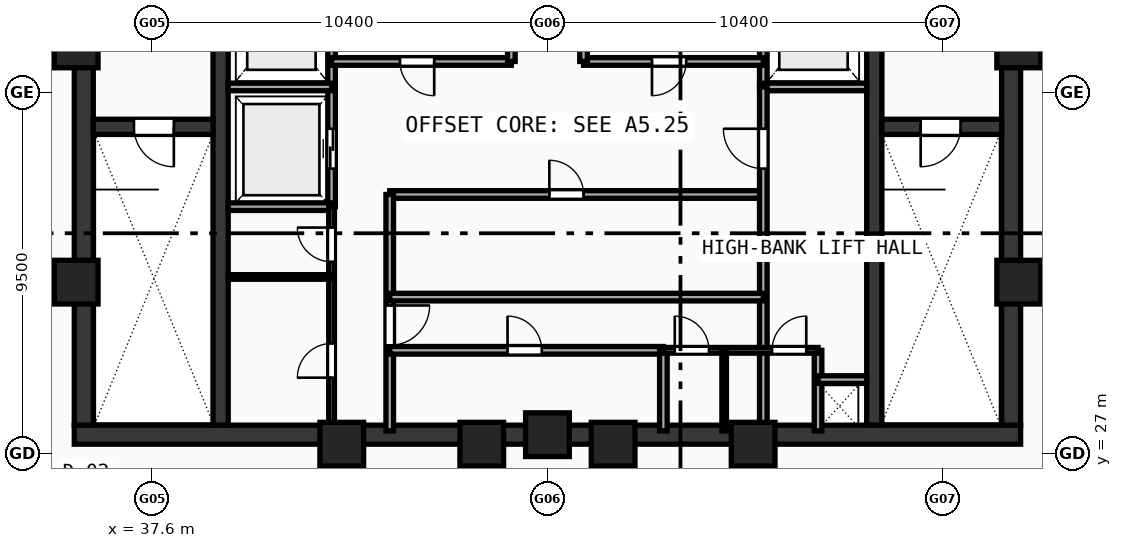
"""IFC4 building model, lengths in metres.
Left out: names, types, materials, properties, quantities, classifications, styles, units other than length and angle.
Written with IfcOpenShell. Run it as: python <this file> out.ifc"""

import sys

from ifc_helpers import new_model, si_unit, direction, frame, frame_2d, origin, origin_with_axes, origin_2d, place, context, subcontext, project, spatial, rectangle, hollow_rectangle, extrude, source, transform, mapped, element, fill, save


model = new_model("IFC4")
c1 = context("Model", 3, precision=1e-05, world=origin(), true_north=direction((0.0, 1.0)))
c2 = subcontext(c1, "Body", "Model", "MODEL_VIEW")
j1 = project(units=[si_unit("LENGTHUNIT", "METRE"), si_unit("PLANEANGLEUNIT", "RADIAN")], contexts=[c1])
p1 = place(None, origin())
s1 = spatial("IfcSite", under=j1, at=p1, CompositionType="ELEMENT")
p2 = place(p1, origin())
s2 = spatial("IfcBuilding", under=s1, at=p2, CompositionType="ELEMENT")
p3 = place(p2, frame((0.0, 0.0, 396.76)))
s3 = spatial("IfcBuildingStorey", under=s2, at=p3, CompositionType="ELEMENT", Elevation=396.76)
p4 = place(p3, frame((35.55, 27.5, 0.0), z_axis=(0.0, 0.0, 1.0), x_axis=(1.0, 0.0, 0.0)))
e1 = element("IfcWall", 1, at=p4, inside=s3, PredefinedType="SHEAR", context=c2, shape_type="SweptSolid", body=[
    extrude(rectangle(XDim=24.9, YDim=0.5, at=frame_2d((12.45, 0.0))), origin(), (0.0, 0.0, 1.0), 4.72),
])
for number, where, z_axis, x_axis in (
    (2, (35.8, 27.75, 0.0), (0.0, 0.0, 1.0), (0.0, 1.0, 0.0)),
    (3, (60.2, 27.75, 0.0), (0.0, 0.0, 1.0), (0.0, 1.0, 0.0)),
):
    element("IfcWall", number, at=place(p3, frame(where, z_axis=z_axis, x_axis=x_axis)), inside=s3, PredefinedType="SHEAR", context=c2, shape_type="SweptSolid", body=[
        extrude(rectangle(XDim=12.2, YDim=0.5, at=frame_2d((6.1, 0.0))), origin(), (0.0, 0.0, 1.0), 4.72),
    ])
p5 = place(p3, frame((39.4, 27.75, 0.0), z_axis=(0.0, 0.0, 1.0), x_axis=(0.0, 1.0, 0.0)))
e4 = element("IfcWall", 4, at=p5, inside=s3, PredefinedType="SHEAR", context=c2, shape_type="SweptSolid", body=[
    extrude(rectangle(XDim=12.2, YDim=0.4, at=frame_2d((6.1, 0.0))), origin(), (0.0, 0.0, 1.0), 4.72),
])
p6 = place(p5, frame((10.0, 0.0, 0.0)))
e5 = element("IfcOpeningElement", 5, at=p6, cuts=e4, PredefinedType="OPENING", context=c2, shape_type="SweptSolid", body=[
    extrude(rectangle(XDim=1.1, YDim=2.1, at=frame_2d((0.55, 1.05))), frame((0.0, 0.21, 0.0), z_axis=(0.0, -1.0, 0.0), x_axis=(1.0, 0.0, 0.0)), (0.0, 0.0, 1.0), 0.42),
])
p7 = place(p3, frame((56.6, 27.75, 0.0), z_axis=(0.0, 0.0, 1.0), x_axis=(0.0, 1.0, 0.0)))
e6 = element("IfcWall", 6, at=p7, inside=s3, PredefinedType="SHEAR", context=c2, shape_type="SweptSolid", body=[
    extrude(rectangle(XDim=12.2, YDim=0.4, at=frame_2d((6.1, 0.0))), origin(), (0.0, 0.0, 1.0), 4.72),
])
p8 = place(p7, frame((10.0, 0.0, 0.0)))
e7 = element("IfcOpeningElement", 7, at=p8, cuts=e6, PredefinedType="OPENING", context=c2, shape_type="SweptSolid", body=[
    extrude(rectangle(XDim=1.1, YDim=2.1, at=frame_2d((0.55, 1.05))), frame((0.0, 0.21, 0.0), z_axis=(0.0, -1.0, 0.0), x_axis=(1.0, 0.0, 0.0)), (0.0, 0.0, 1.0), 0.42),
])
p9 = place(p3, frame((36.05, 35.6, 0.0), z_axis=(0.0, 0.0, 1.0), x_axis=(1.0, 0.0, 0.0)))
e8 = element("IfcWall", 8, at=p9, inside=s3, PredefinedType="SHEAR", context=c2, shape_type="SweptSolid", body=[
    extrude(rectangle(XDim=3.15, YDim=0.4, at=frame_2d((1.575, 0.0))), origin(), (0.0, 0.0, 1.0), 4.72),
])
p10 = place(p9, frame((1.07, 0.0, 0.0)))
e9 = element("IfcOpeningElement", 9, at=p10, cuts=e8, PredefinedType="OPENING", context=c2, shape_type="SweptSolid", body=[
    extrude(rectangle(XDim=1.05, YDim=2.1, at=frame_2d((0.525, 1.05))), frame((0.0, 0.21, 0.0), z_axis=(0.0, -1.0, 0.0), x_axis=(1.0, 0.0, 0.0)), (0.0, 0.0, 1.0), 0.42),
])
p11 = place(p3, frame((56.8, 35.6, 0.0), z_axis=(0.0, 0.0, 1.0), x_axis=(1.0, 0.0, 0.0)))
e10 = element("IfcWall", 10, at=p11, inside=s3, PredefinedType="SHEAR", context=c2, shape_type="SweptSolid", body=[
    extrude(rectangle(XDim=3.15, YDim=0.4, at=frame_2d((1.575, 0.0))), origin(), (0.0, 0.0, 1.0), 4.72),
])
p12 = place(p11, frame((1.02, 0.0, 0.0)))
e11 = element("IfcOpeningElement", 11, at=p12, cuts=e10, PredefinedType="OPENING", context=c2, shape_type="SweptSolid", body=[
    extrude(rectangle(XDim=1.05, YDim=2.1, at=frame_2d((0.525, 1.05))), frame((0.0, 0.21, 0.0), z_axis=(0.0, -1.0, 0.0), x_axis=(1.0, 0.0, 0.0)), (0.0, 0.0, 1.0), 0.42),
])
m1 = source(origin(), c2, "Body", "SweptSolid", [
    extrude(hollow_rectangle(XDim=1.15, YDim=1.15, WallThickness=0.048, at=origin_2d()), origin(), (0.0, 0.0, 1.0), 5.0),
])
for number, where, z_axis, x_axis in (
    (12, (42.588, 27.25, -0.28), (0.0, 0.0, 1.0), (1.0, 0.0, 0.0)),
    (13, (46.272, 27.25, -0.28), (0.0, 0.0, 1.0), (1.0, 0.0, 0.0)),
    (14, (49.729, 27.25, -0.28), (0.0, 0.0, 1.0), (1.0, 0.0, 0.0)),
    (15, (53.412, 27.25, -0.28), (0.0, 0.0, 1.0), (1.0, 0.0, 0.0)),
    (16, (60.4, 31.513, -0.28), (0.0, 0.0, 1.0), (1.0, 0.0, 0.0)),
    (17, (60.4, 37.729, -0.28), (0.0, 0.0, 1.0), (1.0, 0.0, 0.0)),
    (18, (35.6, 37.729, -0.28), (0.0, 0.0, 1.0), (1.0, 0.0, 0.0)),
    (19, (35.6, 31.513, -0.28), (0.0, 0.0, 1.0), (1.0, 0.0, 0.0)),
    (20, (48.0, 27.5, -0.28), (0.0, 0.0, 1.0), (1.0, 0.0, 0.0)),
):
    element("IfcColumn", number, at=place(p3, frame(where, z_axis=z_axis, x_axis=x_axis)), inside=s3, PredefinedType="COLUMN", context=c2, shape_type="MappedRepresentation", body=[
        mapped(m1, transform((0.0, 0.0, 0.0), scale=1.0)),
    ])
p13 = place(p3, frame((42.32, 33.5, 0.0), z_axis=(0.0, 0.0, 1.0), x_axis=(0.0, 1.0, 0.0)))
e21 = element("IfcWall", 21, at=p13, inside=s3, PredefinedType="SOLIDWALL", context=c2, shape_type="SweptSolid", body=[
    extrude(rectangle(XDim=6.45, YDim=0.2, at=frame_2d((3.225, 0.0))), origin(), (0.0, 0.0, 1.0), 4.72),
])
p14 = place(p13, frame((1.0, 0.0, 0.0)))
e22 = element("IfcOpeningElement", 22, at=p14, cuts=e21, PredefinedType="OPENING", context=c2, shape_type="SweptSolid", body=[
    extrude(rectangle(XDim=1.05, YDim=2.1, at=frame_2d((0.525, 1.05))), frame((0.0, 0.11, 0.0), z_axis=(0.0, -1.0, 0.0), x_axis=(1.0, 0.0, 0.0)), (0.0, 0.0, 1.0), 0.22),
])
for number, where, z_axis, x_axis in (
    (23, (39.6, 36.65, 0.0), (0.0, 0.0, 1.0), (1.0, 0.0, 0.0)),
    (24, (39.6, 33.5, 0.0), (0.0, 0.0, 1.0), (1.0, 0.0, 0.0)),
):
    element("IfcWall", number, at=place(p3, frame(where, z_axis=z_axis, x_axis=x_axis)), inside=s3, PredefinedType="SOLIDWALL", context=c2, shape_type="SweptSolid", body=[
        extrude(rectangle(XDim=2.72, YDim=0.2, at=frame_2d((1.36, 0.0))), origin(), (0.0, 0.0, 1.0), 4.72),
    ])
p15 = place(p3, frame((53.68, 36.65, 0.0), z_axis=(0.0, 0.0, 1.0), x_axis=(0.0, 1.0, 0.0)))
e25 = element("IfcWall", 25, at=p15, inside=s3, PredefinedType="SOLIDWALL", context=c2, shape_type="SweptSolid", body=[
    extrude(rectangle(XDim=3.3, YDim=0.2, at=frame_2d((1.65, 0.0))), origin(), (0.0, 0.0, 1.0), 4.72),
])
p16 = place(p3, frame((53.68, 36.65, 0.0), z_axis=(0.0, 0.0, 1.0), x_axis=(1.0, 0.0, 0.0)))
e26 = element("IfcWall", 26, at=p16, inside=s3, PredefinedType="SOLIDWALL", context=c2, shape_type="SweptSolid", body=[
    extrude(rectangle(XDim=2.72, YDim=0.2, at=frame_2d((1.36, 0.0))), origin(), (0.0, 0.0, 1.0), 4.72),
])
p17 = place(p3, frame((42.32, 37.32, 0.0), z_axis=(0.0, 0.0, 1.0), x_axis=(1.0, 0.0, 0.0)))
e27 = element("IfcWall", 27, at=p17, inside=s3, PredefinedType="SOLIDWALL", context=c2, shape_type="SweptSolid", body=[
    extrude(rectangle(XDim=4.73, YDim=0.2, at=frame_2d((2.365, 0.0))), origin(), (0.0, 0.0, 1.0), 4.72),
])
p18 = place(p17, frame((1.8, 0.0, 0.0)))
e28 = element("IfcOpeningElement", 28, at=p18, cuts=e27, PredefinedType="OPENING", context=c2, shape_type="SweptSolid", body=[
    extrude(rectangle(XDim=0.9, YDim=2.1, at=frame_2d((0.45, 1.05))), frame((0.0, 0.11, 0.0), z_axis=(0.0, -1.0, 0.0), x_axis=(1.0, 0.0, 0.0)), (0.0, 0.0, 1.0), 0.22),
])
p19 = place(p3, frame((48.95, 37.32, 0.0), z_axis=(0.0, 0.0, 1.0), x_axis=(1.0, 0.0, 0.0)))
e29 = element("IfcWall", 29, at=p19, inside=s3, PredefinedType="SOLIDWALL", context=c2, shape_type="SweptSolid", body=[
    extrude(rectangle(XDim=4.73, YDim=0.2, at=frame_2d((2.365, 0.0))), origin(), (0.0, 0.0, 1.0), 4.72),
])
p20 = place(p19, frame((1.8, 0.0, 0.0)))
e30 = element("IfcOpeningElement", 30, at=p20, cuts=e29, PredefinedType="OPENING", context=c2, shape_type="SweptSolid", body=[
    extrude(rectangle(XDim=0.9, YDim=2.1, at=frame_2d((0.45, 1.05))), frame((0.0, 0.11, 0.0), z_axis=(0.0, -1.0, 0.0), x_axis=(1.0, 0.0, 0.0)), (0.0, 0.0, 1.0), 0.22),
])
for number, where, z_axis, x_axis in (
    (31, (47.05, 37.32, 0.0), (0.0, 0.0, 1.0), (0.0, 1.0, 0.0)),
    (32, (48.95, 37.32, 0.0), (0.0, 0.0, 1.0), (0.0, 1.0, 0.0)),
):
    element("IfcWall", number, at=place(p3, frame(where, z_axis=z_axis, x_axis=x_axis)), inside=s3, PredefinedType="SOLIDWALL", context=c2, shape_type="SweptSolid", body=[
        extrude(rectangle(XDim=2.63, YDim=0.2, at=frame_2d((1.315, 0.0))), origin(), (0.0, 0.0, 1.0), 4.72),
    ])
p21 = place(p3, frame((43.85, 33.82, 0.0), z_axis=(0.0, 0.0, 1.0), x_axis=(1.0, 0.0, 0.0)))
e33 = element("IfcWall", 33, at=p21, inside=s3, PredefinedType="SOLIDWALL", context=c2, shape_type="SweptSolid", body=[
    extrude(rectangle(XDim=9.83, YDim=0.2, at=frame_2d((4.915, 0.0))), origin(), (0.0, 0.0, 1.0), 4.72),
])
p22 = place(p21, frame((4.2, 0.0, 0.0)))
e34 = element("IfcOpeningElement", 34, at=p22, cuts=e33, PredefinedType="OPENING", context=c2, shape_type="SweptSolid", body=[
    extrude(rectangle(XDim=0.9, YDim=2.1, at=frame_2d((0.45, 1.05))), frame((0.0, 0.11, 0.0), z_axis=(0.0, -1.0, 0.0), x_axis=(1.0, 0.0, 0.0)), (0.0, 0.0, 1.0), 0.22),
])
p23 = place(p3, frame((43.85, 27.6, 0.0), z_axis=(0.0, 0.0, 1.0), x_axis=(0.0, 1.0, 0.0)))
e35 = element("IfcWall", 35, at=p23, inside=s3, PredefinedType="SOLIDWALL", context=c2, shape_type="SweptSolid", body=[
    extrude(rectangle(XDim=6.22, YDim=0.2, at=frame_2d((3.11, 0.0))), origin(), (0.0, 0.0, 1.0), 4.72),
])
p24 = place(p23, frame((2.25, 0.0, 0.0)))
e36 = element("IfcOpeningElement", 36, at=p24, cuts=e35, PredefinedType="OPENING", context=c2, shape_type="SweptSolid", body=[
    extrude(rectangle(XDim=1.05, YDim=2.1, at=frame_2d((0.525, 1.05))), frame((0.0, 0.11, 0.0), z_axis=(0.0, -1.0, 0.0), x_axis=(1.0, 0.0, 0.0)), (0.0, 0.0, 1.0), 0.22),
])
p25 = place(p3, frame((53.68, 27.6, 0.0), z_axis=(0.0, 0.0, 1.0), x_axis=(0.0, 1.0, 0.0)))
e37 = element("IfcWall", 37, at=p25, inside=s3, PredefinedType="SOLIDWALL", context=c2, shape_type="SweptSolid", body=[
    extrude(rectangle(XDim=9.05, YDim=0.2, at=frame_2d((4.525, 0.0))), origin(), (0.0, 0.0, 1.0), 4.72),
])
p26 = place(p25, frame((6.9, 0.0, 0.0)))
e38 = element("IfcOpeningElement", 38, at=p26, cuts=e37, PredefinedType="OPENING", context=c2, shape_type="SweptSolid", body=[
    extrude(rectangle(XDim=1.05, YDim=2.1, at=frame_2d((0.525, 1.05))), frame((0.0, 0.11, 0.0), z_axis=(0.0, -1.0, 0.0), x_axis=(1.0, 0.0, 0.0)), (0.0, 0.0, 1.0), 0.22),
])
p27 = place(p3, frame((43.85, 29.72, 0.0), z_axis=(0.0, 0.0, 1.0), x_axis=(1.0, 0.0, 0.0)))
e39 = element("IfcWall", 39, at=p27, inside=s3, PredefinedType="SOLIDWALL", context=c2, shape_type="SweptSolid", body=[
    extrude(rectangle(XDim=7.2, YDim=0.2, at=frame_2d((3.6, 0.0))), origin(), (0.0, 0.0, 1.0), 4.72),
])
p28 = place(p27, frame((3.1, 0.0, 0.0)))
e40 = element("IfcOpeningElement", 40, at=p28, cuts=e39, PredefinedType="OPENING", context=c2, shape_type="SweptSolid", body=[
    extrude(rectangle(XDim=0.9, YDim=2.1, at=frame_2d((0.45, 1.05))), frame((0.0, 0.11, 0.0), z_axis=(0.0, -1.0, 0.0), x_axis=(1.0, 0.0, 0.0)), (0.0, 0.0, 1.0), 0.22),
])
p29 = place(p3, frame((51.05, 27.6, 0.0), z_axis=(0.0, 0.0, 1.0), x_axis=(0.0, 1.0, 0.0)))
e41 = element("IfcWall", 41, at=p29, inside=s3, PredefinedType="SOLIDWALL", context=c2, shape_type="SweptSolid", body=[
    extrude(rectangle(XDim=2.12, YDim=0.2, at=frame_2d((1.06, 0.0))), origin(), (0.0, 0.0, 1.0), 4.72),
])
p30 = place(p3, frame((43.85, 31.12, 0.0), z_axis=(0.0, 0.0, 1.0), x_axis=(1.0, 0.0, 0.0)))
e42 = element("IfcWall", 42, at=p30, inside=s3, PredefinedType="SOLIDWALL", context=c2, shape_type="SweptSolid", body=[
    extrude(rectangle(XDim=9.83, YDim=0.2, at=frame_2d((4.915, 0.0))), origin(), (0.0, 0.0, 1.0), 4.72),
])
p31 = place(p3, frame((55.12, 27.6, 0.0), z_axis=(0.0, 0.0, 1.0), x_axis=(0.0, 1.0, 0.0)))
e43 = element("IfcWall", 43, at=p31, inside=s3, PredefinedType="SOLIDWALL", context=c2, shape_type="SweptSolid", body=[
    extrude(rectangle(XDim=2.12, YDim=0.2, at=frame_2d((1.06, 0.0))), origin(), (0.0, 0.0, 1.0), 4.72),
])
p32 = place(p3, frame((55.12, 28.95, 0.0), z_axis=(0.0, 0.0, 1.0), x_axis=(1.0, 0.0, 0.0)))
e44 = element("IfcWall", 44, at=p32, inside=s3, PredefinedType="SOLIDWALL", context=c2, shape_type="SweptSolid", body=[
    extrude(rectangle(XDim=1.28, YDim=0.2, at=frame_2d((0.64, 0.0))), origin(), (0.0, 0.0, 1.0), 4.72),
])
p33 = place(p3, frame((42.32, 27.6, 0.0), z_axis=(0.0, 0.0, 1.0), x_axis=(0.0, 1.0, 0.0)))
e45 = element("IfcWall", 45, at=p33, inside=s3, PredefinedType="PARTITIONING", context=c2, shape_type="SweptSolid", body=[
    extrude(rectangle(XDim=5.9, YDim=0.15, at=frame_2d((2.95, 0.0))), origin(), (0.0, 0.0, 1.0), 4.72),
])
p34 = place(p33, frame((1.4, 0.0, 0.0)))
e46 = element("IfcOpeningElement", 46, at=p34, cuts=e45, PredefinedType="OPENING", context=c2, shape_type="SweptSolid", body=[
    extrude(rectangle(XDim=0.9, YDim=2.1, at=frame_2d((0.45, 1.05))), frame((0.0, 0.085, 0.0), z_axis=(0.0, -1.0, 0.0), x_axis=(1.0, 0.0, 0.0)), (0.0, 0.0, 1.0), 0.17),
])
p35 = place(p33, frame((4.45, 0.0, 0.0)))
e47 = element("IfcOpeningElement", 47, at=p35, cuts=e45, PredefinedType="OPENING", context=c2, shape_type="SweptSolid", body=[
    extrude(rectangle(XDim=0.9, YDim=2.1, at=frame_2d((0.45, 1.05))), frame((0.0, 0.085, 0.0), z_axis=(0.0, -1.0, 0.0), x_axis=(1.0, 0.0, 0.0)), (0.0, 0.0, 1.0), 0.17),
])
p36 = place(p3, frame((51.05, 29.72, 0.0), z_axis=(0.0, 0.0, 1.0), x_axis=(1.0, 0.0, 0.0)))
e48 = element("IfcWall", 48, at=p36, inside=s3, PredefinedType="PARTITIONING", context=c2, shape_type="SweptSolid", body=[
    extrude(rectangle(XDim=4.07, YDim=0.15, at=frame_2d((2.035, 0.0))), origin(), (0.0, 0.0, 1.0), 4.72),
])
p37 = place(p36, frame((0.3, 0.0, 0.0)))
e49 = element("IfcOpeningElement", 49, at=p37, cuts=e48, PredefinedType="OPENING", context=c2, shape_type="SweptSolid", body=[
    extrude(rectangle(XDim=0.9, YDim=2.1, at=frame_2d((0.45, 1.05))), frame((0.0, 0.085, 0.0), z_axis=(0.0, -1.0, 0.0), x_axis=(1.0, 0.0, 0.0)), (0.0, 0.0, 1.0), 0.17),
])
p38 = place(p36, frame((2.86, 0.0, 0.0)))
e50 = element("IfcOpeningElement", 50, at=p38, cuts=e48, PredefinedType="OPENING", context=c2, shape_type="SweptSolid", body=[
    extrude(rectangle(XDim=0.9, YDim=2.1, at=frame_2d((0.45, 1.05))), frame((0.0, 0.085, 0.0), z_axis=(0.0, -1.0, 0.0), x_axis=(1.0, 0.0, 0.0)), (0.0, 0.0, 1.0), 0.17),
])
p39 = place(p3, frame((39.6, 31.65, 0.0), z_axis=(0.0, 0.0, 1.0), x_axis=(1.0, 0.0, 0.0)))
e51 = element("IfcWall", 51, at=p39, inside=s3, PredefinedType="PARTITIONING", context=c2, shape_type="SweptSolid", body=[
    extrude(rectangle(XDim=2.72, YDim=0.12, at=frame_2d((1.36, 0.0))), origin(), (0.0, 0.0, 1.0), 4.72),
])
p40 = place(p3, frame((52.65, 27.6, 0.0), z_axis=(0.0, 0.0, 1.0), x_axis=(0.0, 1.0, 0.0)))
e52 = element("IfcWall", 52, at=p40, inside=s3, PredefinedType="PARTITIONING", context=c2, shape_type="SweptSolid", body=[
    extrude(rectangle(XDim=2.12, YDim=0.12, at=frame_2d((1.06, 0.0))), origin(), (0.0, 0.0, 1.0), 4.72),
])
m2 = source(origin(), c2, "Body", "SweptSolid", [
    extrude(rectangle(XDim=1.05, YDim=2.1, at=frame_2d((0.525, 1.05))), frame((0.0, 0.025, 0.0), z_axis=(0.0, -1.0, 0.0), x_axis=(1.0, 0.0, 0.0)), (0.0, 0.0, 1.0), 0.05),
])
p41 = place(p10, frame((1.05, 0.0, 0.0), z_axis=(0.0, 0.0, 1.0), x_axis=(-1.0, 0.0, 0.0)))
e53 = element("IfcDoor", 53, at=p41, inside=s3, OperationType="SINGLE_SWING_LEFT", PredefinedType="DOOR", context=c2, shape_type="MappedRepresentation", body=[
    mapped(m2, transform((0.0, 0.0, 0.0), scale=1.0)),
])
fill(e9, e53)
p42 = place(p12, frame((1.05, 0.0, 0.0), z_axis=(0.0, 0.0, 1.0), x_axis=(-1.0, 0.0, 0.0)))
e54 = element("IfcDoor", 54, at=p42, inside=s3, OperationType="SINGLE_SWING_RIGHT", PredefinedType="DOOR", context=c2, shape_type="MappedRepresentation", body=[
    mapped(m2, transform((0.0, 0.0, 0.0), scale=1.0)),
])
fill(e11, e54)
p43 = place(p14, origin_with_axes())
e55 = element("IfcDoor", 55, at=p43, inside=s3, OperationType="DOUBLE_DOOR_SLIDING", PredefinedType="DOOR", context=c2, shape_type="MappedRepresentation", body=[
    mapped(m2, transform((0.0, 0.0, 0.0), scale=1.0)),
])
fill(e22, e55)
m3 = source(origin(), c2, "Body", "SweptSolid", [
    extrude(rectangle(XDim=0.9, YDim=2.1, at=frame_2d((0.45, 1.05))), frame((0.0, 0.025, 0.0), z_axis=(0.0, -1.0, 0.0), x_axis=(1.0, 0.0, 0.0)), (0.0, 0.0, 1.0), 0.05),
])
p44 = place(p18, frame((0.9, 0.0, 0.0), z_axis=(0.0, 0.0, 1.0), x_axis=(-1.0, 0.0, 0.0)))
e56 = element("IfcDoor", 56, at=p44, inside=s3, OperationType="SINGLE_SWING_LEFT", PredefinedType="DOOR", context=c2, shape_type="MappedRepresentation", body=[
    mapped(m3, transform((0.0, 0.0, 0.0), scale=1.0)),
])
fill(e28, e56)
p45 = place(p20, frame((0.9, 0.0, 0.0), z_axis=(0.0, 0.0, 1.0), x_axis=(-1.0, 0.0, 0.0)))
e57 = element("IfcDoor", 57, at=p45, inside=s3, OperationType="SINGLE_SWING_RIGHT", PredefinedType="DOOR", context=c2, shape_type="MappedRepresentation", body=[
    mapped(m3, transform((0.0, 0.0, 0.0), scale=1.0)),
])
fill(e30, e57)
p46 = place(p22, origin_with_axes())
e58 = element("IfcDoor", 58, at=p46, inside=s3, OperationType="SINGLE_SWING_LEFT", PredefinedType="DOOR", context=c2, shape_type="MappedRepresentation", body=[
    mapped(m3, transform((0.0, 0.0, 0.0), scale=1.0)),
])
fill(e34, e58)
p47 = place(p24, frame((1.05, 0.0, 0.0), z_axis=(0.0, 0.0, 1.0), x_axis=(-1.0, 0.0, 0.0)))
e59 = element("IfcDoor", 59, at=p47, inside=s3, OperationType="SINGLE_SWING_LEFT", PredefinedType="DOOR", context=c2, shape_type="MappedRepresentation", body=[
    mapped(m2, transform((0.0, 0.0, 0.0), scale=1.0)),
])
fill(e36, e59)
p48 = place(p26, origin_with_axes())
e60 = element("IfcDoor", 60, at=p48, inside=s3, OperationType="SINGLE_SWING_RIGHT", PredefinedType="DOOR", context=c2, shape_type="MappedRepresentation", body=[
    mapped(m2, transform((0.0, 0.0, 0.0), scale=1.0)),
])
fill(e38, e60)
p49 = place(p28, origin_with_axes())
e61 = element("IfcDoor", 61, at=p49, inside=s3, OperationType="SINGLE_SWING_LEFT", PredefinedType="DOOR", context=c2, shape_type="MappedRepresentation", body=[
    mapped(m3, transform((0.0, 0.0, 0.0), scale=1.0)),
])
fill(e40, e61)
p50 = place(p34, origin_with_axes())
e62 = element("IfcDoor", 62, at=p50, inside=s3, OperationType="SINGLE_SWING_LEFT", PredefinedType="DOOR", context=c2, shape_type="MappedRepresentation", body=[
    mapped(m3, transform((0.0, 0.0, 0.0), scale=1.0)),
])
fill(e46, e62)
p51 = place(p35, origin_with_axes())
e63 = element("IfcDoor", 63, at=p51, inside=s3, OperationType="SINGLE_SWING_RIGHT", PredefinedType="DOOR", context=c2, shape_type="MappedRepresentation", body=[
    mapped(m3, transform((0.0, 0.0, 0.0), scale=1.0)),
])
fill(e47, e63)
p52 = place(p37, origin_with_axes())
e64 = element("IfcDoor", 64, at=p52, inside=s3, OperationType="SINGLE_SWING_LEFT", PredefinedType="DOOR", context=c2, shape_type="MappedRepresentation", body=[
    mapped(m3, transform((0.0, 0.0, 0.0), scale=1.0)),
])
fill(e49, e64)
p53 = place(p38, origin_with_axes())
e65 = element("IfcDoor", 65, at=p53, inside=s3, OperationType="SINGLE_SWING_RIGHT", PredefinedType="DOOR", context=c2, shape_type="MappedRepresentation", body=[
    mapped(m3, transform((0.0, 0.0, 0.0), scale=1.0)),
])
fill(e50, e65)
save(model, sys.argv[1])
